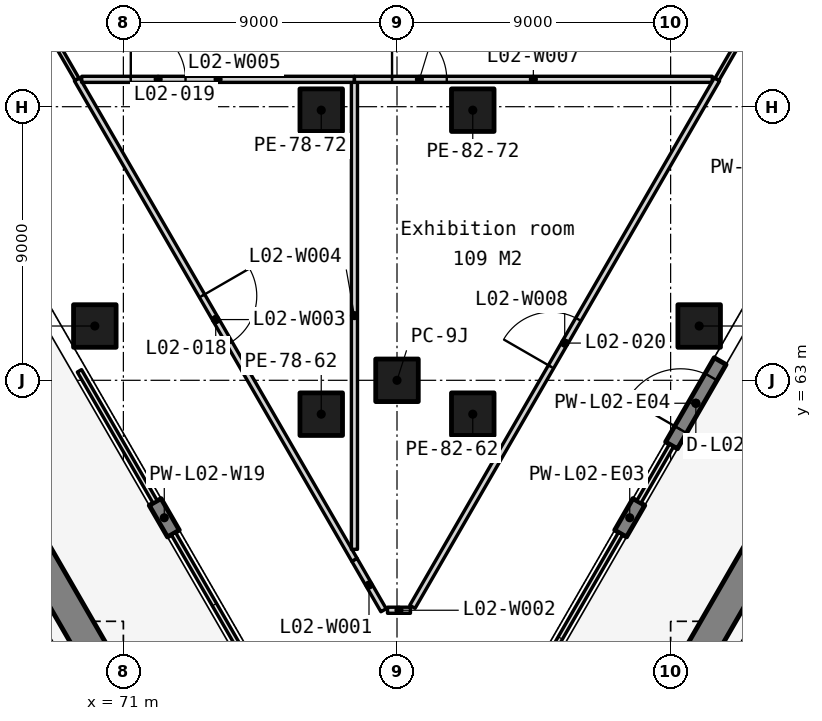
"""IFC4 building model, lengths in metres.
Left out: names, types, materials, properties, quantities, classifications, styles, units other than length and angle.
Written with IfcOpenShell. Run it as: python <this file> out.ifc"""

import sys

from ifc_helpers import new_model, si_unit, direction, frame, frame_2d, origin, origin_2d, place, context, subcontext, project, spatial, rectangle, extrude, element, fill, save


model = new_model("IFC4")
c1 = context("Model", 3, precision=1e-05, world=origin(), true_north=direction((0.0, 1.0)))
c2 = subcontext(c1, "Body", "Model", "MODEL_VIEW")
j1 = project(units=[si_unit("LENGTHUNIT", "METRE"), si_unit("PLANEANGLEUNIT", "RADIAN")], contexts=[c1])
p1 = place(None, origin())
s1 = spatial("IfcSite", under=j1, at=p1, CompositionType="ELEMENT")
p2 = place(p1, origin())
s2 = spatial("IfcBuilding", under=s1, at=p2, CompositionType="ELEMENT")
p3 = place(p2, frame((0.0, 0.0, 13.5)))
s3 = spatial("IfcBuildingStorey", under=s2, at=p3, CompositionType="ELEMENT", Elevation=13.5)
for number, where, z_axis, x_axis in (
    (1, (80.0, 63.0, 0.0), (0.0, 0.0, 1.0), (1.0, 0.0, 0.0)),
    (2, (70.061, 64.786, 0.0), (0.0, 0.0, 1.0), (1.0, 0.0, 0.0)),
    (3, (77.508, 61.886, 0.0), (0.0, 0.0, 1.0), (1.0, 0.0, 0.0)),
    (4, (77.508, 71.886, 0.0), (0.0, 0.0, 1.0), (1.0, 0.0, 0.0)),
    (5, (82.492, 61.886, 0.0), (0.0, 0.0, 1.0), (1.0, 0.0, 0.0)),
    (6, (82.492, 71.886, 0.0), (0.0, 0.0, 1.0), (1.0, 0.0, 0.0)),
    (7, (89.939, 64.786, 0.0), (0.0, 0.0, 1.0), (1.0, 0.0, 0.0)),
):
    element("IfcColumn", number, at=place(p3, frame(where, z_axis=z_axis, x_axis=x_axis)), inside=s3, PredefinedType="COLUMN", context=c2, shape_type="SweptSolid", body=[
        extrude(rectangle(XDim=1.4, YDim=1.4, at=origin_2d()), origin(), (0.0, 0.0, 1.0), 6.0),
    ])
for number, where, z_axis, x_axis in (
    (8, (72.045, 58.998, -0.3), (0.0, 0.0, 1.0), (0.5, -0.866, 0.0)),
    (9, (87.354, 57.959, -0.3), (0.0, 0.0, 1.0), (0.5, 0.866, 0.0)),
):
    element("IfcWall", number, at=place(p3, frame(where, z_axis=z_axis, x_axis=x_axis)), inside=s3, PredefinedType="SOLIDWALL", context=c2, shape_type="SweptSolid", body=[
        extrude(rectangle(XDim=1.2, YDim=0.45, at=frame_2d((0.6, 0.0))), origin(), (0.0, 0.0, 1.0), 5.363),
    ])
p4 = place(p3, frame((89.029, 60.86, -0.3), z_axis=(0.0, 0.0, 1.0), x_axis=(0.499971222258, 0.866042017984, 0.0)))
e10 = element("IfcWall", 10, at=p4, inside=s3, PredefinedType="SOLIDWALL", context=c2, shape_type="SweptSolid", body=[
    extrude(rectangle(XDim=3.2, YDim=0.45, at=frame_2d((1.6, 0.0))), origin(), (0.0, 0.0, 1.0), 5.363),
])
p5 = place(p4, frame((0.6, 0.0, 0.3)))
e11 = element("IfcOpeningElement", 11, at=p5, cuts=e10, PredefinedType="OPENING", context=c2, shape_type="SweptSolid", body=[
    extrude(rectangle(XDim=2.0, YDim=2.4, at=frame_2d((1.0, 1.2))), frame((0.0, 0.235, 0.0), z_axis=(0.0, -1.0, 0.0), x_axis=(1.0, 0.0, 0.0)), (0.0, 0.0, 1.0), 0.47),
])
for number, where, z_axis, x_axis in (
    (12, (133.302, 129.091, 0.0), (0.0, 0.0, 1.0), (-0.5, -0.866, 0.0)),
    (13, (77.166, 41.679, 0.0), (0.0, 0.0, 1.0), (-0.5, 0.866, 0.0)),
):
    element("IfcWall", number, at=place(p3, frame(where, z_axis=z_axis, x_axis=x_axis)), inside=s3, PredefinedType="STANDARD", context=c2, shape_type="SweptSolid", body=[
        extrude(rectangle(XDim=100.935, YDim=1.0, at=frame_2d((50.467, 0.0))), origin(), (0.0, 0.0, 1.0), 0.6),
    ])
p6 = place(p3, frame((78.6, 57.095, 0.0), z_axis=(0.0, 0.0, 1.0), x_axis=(0.499935729284, -0.86606250732, 0.0)))
e14 = element("IfcWall", 14, at=p6, inside=s3, PredefinedType="PARTITIONING", context=c2, shape_type="SweptSolid", body=[
    extrude(rectangle(XDim=1.916, YDim=0.2, at=frame_2d((0.958, 0.0))), origin(), (0.0, 0.0, 1.0), 5.75),
])
p7 = place(p3, frame((79.688, 55.436, 0.0), z_axis=(0.0, 0.0, 1.0), x_axis=(1.0, 0.0, 0.0)))
e15 = element("IfcWall", 15, at=p7, inside=s3, PredefinedType="PARTITIONING", context=c2, shape_type="SweptSolid", body=[
    extrude(rectangle(XDim=0.754, YDim=0.2, at=frame_2d((0.377, 0.0))), origin(), (0.0, 0.0, 1.0), 5.75),
])
p8 = place(p3, frame((69.475, 72.9, 0.0), z_axis=(0.0, 0.0, 1.0), x_axis=(0.500012344312, -0.866018276675, 0.0)))
e16 = element("IfcWall", 16, at=p8, inside=s3, PredefinedType="PARTITIONING", context=c2, shape_type="SweptSolid", body=[
    extrude(rectangle(XDim=18.25, YDim=0.2, at=frame_2d((9.125, 0.0))), origin(), (0.0, 0.0, 1.0), 5.75),
])
p9 = place(p8, frame((8.225, 0.0, 0.0)))
e17 = element("IfcOpeningElement", 17, at=p9, cuts=e16, PredefinedType="OPENING", context=c2, shape_type="SweptSolid", body=[
    extrude(rectangle(XDim=1.8, YDim=2.1, at=frame_2d((0.9, 1.05))), frame((0.0, 0.11, 0.0), z_axis=(0.0, -1.0, 0.0), x_axis=(1.0, 0.0, 0.0)), (0.0, 0.0, 1.0), 0.22),
])
p10 = place(p3, frame((78.6, 57.44, 0.0), z_axis=(0.0, 0.0, 1.0), x_axis=(0.0, 1.0, 0.0)))
e18 = element("IfcWall", 18, at=p10, inside=s3, PredefinedType="PARTITIONING", context=c2, shape_type="SweptSolid", body=[
    extrude(rectangle(XDim=15.375, YDim=0.2, at=frame_2d((7.687, 0.0))), origin(), (0.0, 0.0, 1.0), 5.75),
])
p11 = place(p3, frame((69.63, 72.9, 0.0), z_axis=(0.0, 0.0, 1.0), x_axis=(1.0, 0.0, 0.0)))
e19 = element("IfcWall", 19, at=p11, inside=s3, PredefinedType="PARTITIONING", context=c2, shape_type="SweptSolid", body=[
    extrude(rectangle(XDim=8.97, YDim=0.2, at=frame_2d((4.485, 0.0))), origin(), (0.0, 0.0, 1.0), 5.75),
])
p12 = place(p11, frame((1.614, 0.0, 0.0)))
e20 = element("IfcOpeningElement", 20, at=p12, cuts=e19, PredefinedType="OPENING", context=c2, shape_type="SweptSolid", body=[
    extrude(rectangle(XDim=1.8, YDim=2.1, at=frame_2d((0.9, 1.05))), frame((0.0, 0.11, 0.0), z_axis=(0.0, -1.0, 0.0), x_axis=(1.0, 0.0, 0.0)), (0.0, 0.0, 1.0), 0.22),
])
p13 = place(p3, frame((44.88, 115.5, 0.0), z_axis=(0.0, 0.0, 1.0), x_axis=(0.499996841654, -0.866027227249, 0.0)))
e21 = element("IfcWall", 21, at=p13, inside=s3, PredefinedType="PARTITIONING", context=c2, shape_type="SweptSolid", body=[
    extrude(rectangle(XDim=49.19, YDim=0.15, at=frame_2d((24.595, 0.0))), origin(), (0.0, 0.0, 1.0), 5.75),
])
p14 = place(p13, frame((23.695, 0.0, 0.0)))
e22 = element("IfcOpeningElement", 22, at=p14, cuts=e21, PredefinedType="OPENING", context=c2, shape_type="SweptSolid", body=[
    extrude(rectangle(XDim=1.8, YDim=2.1, at=frame_2d((0.9, 1.05))), frame((0.0, 0.085, 0.0), z_axis=(0.0, -1.0, 0.0), x_axis=(1.0, 0.0, 0.0)), (0.0, 0.0, 1.0), 0.17),
])
p15 = place(p3, frame((78.6, 72.9, 0.0), z_axis=(0.0, 0.0, 1.0), x_axis=(1.0, 0.0, 0.0)))
e23 = element("IfcWall", 23, at=p15, inside=s3, PredefinedType="PARTITIONING", context=c2, shape_type="SweptSolid", body=[
    extrude(rectangle(XDim=11.77, YDim=0.2, at=frame_2d((5.885, 0.0))), origin(), (0.0, 0.0, 1.0), 5.75),
])
p16 = place(p15, frame((1.237, 0.0, 0.0)))
e24 = element("IfcOpeningElement", 24, at=p16, cuts=e23, PredefinedType="OPENING", context=c2, shape_type="SweptSolid", body=[
    extrude(rectangle(XDim=1.8, YDim=2.1, at=frame_2d((0.9, 1.05))), frame((0.0, 0.11, 0.0), z_axis=(0.0, -1.0, 0.0), x_axis=(1.0, 0.0, 0.0)), (0.0, 0.0, 1.0), 0.22),
])
p17 = place(p3, frame((80.507, 55.549, 0.0), z_axis=(0.0, 0.0, 1.0), x_axis=(0.500006546955, 0.866021623865, 0.0)))
e25 = element("IfcWall", 25, at=p17, inside=s3, PredefinedType="PARTITIONING", context=c2, shape_type="SweptSolid", body=[
    extrude(rectangle(XDim=20.035, YDim=0.2, at=frame_2d((10.018, 0.0))), origin(), (0.0, 0.0, 1.0), 5.75),
])
p18 = place(p17, frame((9.118, 0.0, 0.0)))
e26 = element("IfcOpeningElement", 26, at=p18, cuts=e25, PredefinedType="OPENING", context=c2, shape_type="SweptSolid", body=[
    extrude(rectangle(XDim=1.8, YDim=2.1, at=frame_2d((0.9, 1.05))), frame((0.0, 0.11, 0.0), z_axis=(0.0, -1.0, 0.0), x_axis=(1.0, 0.0, 0.0)), (0.0, 0.0, 1.0), 0.22),
])
p19 = place(p3, frame((90.525, 72.9, 0.0), z_axis=(0.0, 0.0, 1.0), x_axis=(0.499997424756, 0.866026890597, 0.0)))
e27 = element("IfcWall", 27, at=p19, inside=s3, PredefinedType="PARTITIONING", context=c2, shape_type="SweptSolid", body=[
    extrude(rectangle(XDim=49.06, YDim=0.15, at=frame_2d((24.53, 0.0))), origin(), (0.0, 0.0, 1.0), 5.75),
])
p20 = place(p19, frame((11.965, 0.0, 0.0)))
e28 = element("IfcOpeningElement", 28, at=p20, cuts=e27, PredefinedType="OPENING", context=c2, shape_type="SweptSolid", body=[
    extrude(rectangle(XDim=1.8, YDim=2.1, at=frame_2d((0.9, 1.05))), frame((0.0, 0.085, 0.0), z_axis=(0.0, -1.0, 0.0), x_axis=(1.0, 0.0, 0.0)), (0.0, 0.0, 1.0), 0.17),
])
p21 = place(p5, origin())
e29 = element("IfcDoor", 29, at=p21, inside=s3, OperationType="DOUBLE_DOOR_SINGLE_SWING", PredefinedType="DOOR", context=c2, shape_type="SweptSolid", body=[
    extrude(rectangle(XDim=2.0, YDim=2.4, at=frame_2d((1.0, 1.2))), frame((0.0, 0.025, 0.0), z_axis=(0.0, -1.0, 0.0), x_axis=(1.0, 0.0, 0.0)), (0.0, 0.0, 1.0), 0.05),
])
fill(e11, e29)
p22 = place(p9, origin())
e30 = element("IfcDoor", 30, at=p22, inside=s3, OperationType="SINGLE_SWING_LEFT", PredefinedType="DOOR", context=c2, shape_type="SweptSolid", body=[
    extrude(rectangle(XDim=1.8, YDim=2.1, at=frame_2d((0.9, 1.05))), frame((0.0, 0.025, 0.0), z_axis=(0.0, -1.0, 0.0), x_axis=(1.0, 0.0, 0.0)), (0.0, 0.0, 1.0), 0.05),
])
fill(e17, e30)
p23 = place(p12, origin())
e31 = element("IfcDoor", 31, at=p23, inside=s3, OperationType="SINGLE_SWING_LEFT", PredefinedType="DOOR", context=c2, shape_type="SweptSolid", body=[
    extrude(rectangle(XDim=1.8, YDim=2.1, at=frame_2d((0.9, 1.05))), frame((0.0, 0.025, 0.0), z_axis=(0.0, -1.0, 0.0), x_axis=(1.0, 0.0, 0.0)), (0.0, 0.0, 1.0), 0.05),
])
fill(e20, e31)
p24 = place(p18, origin())
e32 = element("IfcDoor", 32, at=p24, inside=s3, OperationType="SINGLE_SWING_LEFT", PredefinedType="DOOR", context=c2, shape_type="SweptSolid", body=[
    extrude(rectangle(XDim=1.8, YDim=2.1, at=frame_2d((0.9, 1.05))), frame((0.0, 0.025, 0.0), z_axis=(0.0, -1.0, 0.0), x_axis=(1.0, 0.0, 0.0)), (0.0, 0.0, 1.0), 0.05),
])
fill(e26, e32)
p25 = place(p16, origin())
e33 = element("IfcDoor", 33, at=p25, inside=s3, OperationType="SINGLE_SWING_LEFT", PredefinedType="DOOR", context=c2, shape_type="SweptSolid", body=[
    extrude(rectangle(XDim=1.8, YDim=2.1, at=frame_2d((0.9, 1.05))), frame((0.0, 0.025, 0.0), z_axis=(0.0, -1.0, 0.0), x_axis=(1.0, 0.0, 0.0)), (0.0, 0.0, 1.0), 0.05),
])
fill(e24, e33)
save(model, sys.argv[1])
